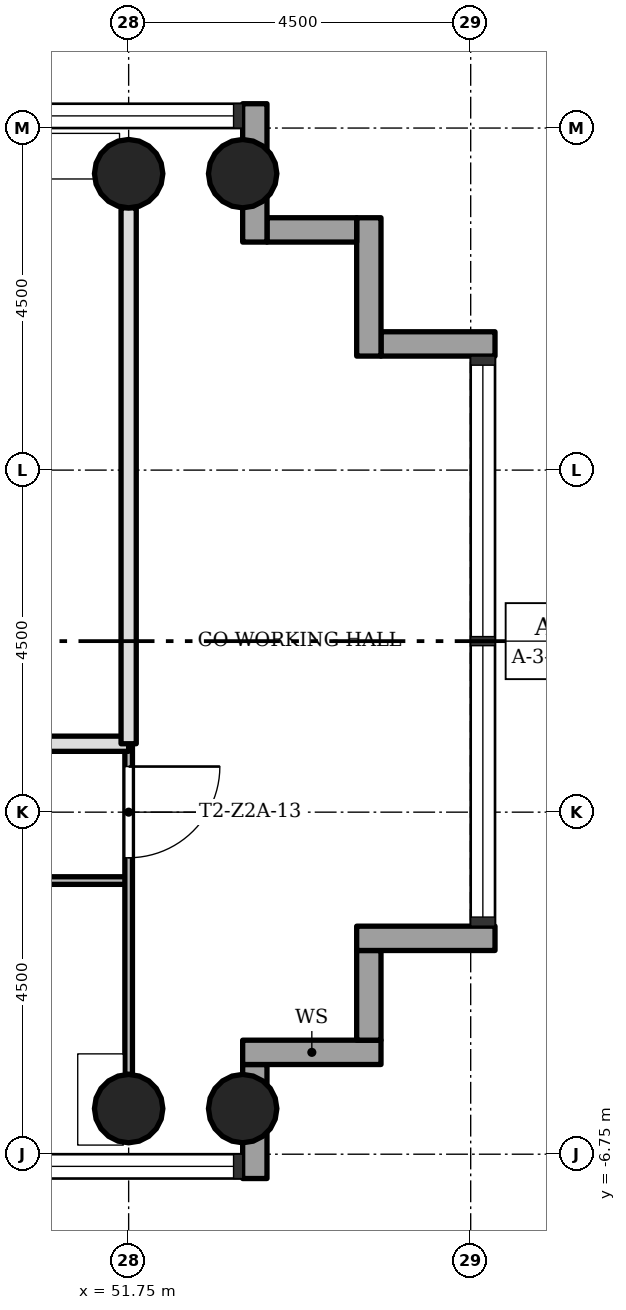
"""IFC4 building model, lengths in metres.
Left out: names, types, materials, properties, quantities, classifications, styles, units other than length and angle.
Written with IfcOpenShell. Run it as: python <this file> out.ifc"""

import sys

from ifc_helpers import new_model, si_unit, direction, frame, frame_2d, origin, origin_2d, place, context, subcontext, project, spatial, rectangle, hollow_circle, extrude, element, fill, save


model = new_model("IFC4")
c1 = context("Model", 3, precision=1e-05, world=origin(), true_north=direction((0.0, 1.0)))
c2 = subcontext(c1, "Body", "Model", "MODEL_VIEW")
j1 = project(units=[si_unit("LENGTHUNIT", "METRE"), si_unit("PLANEANGLEUNIT", "RADIAN")], contexts=[c1])
p1 = place(None, origin())
s1 = spatial("IfcSite", under=j1, at=p1, CompositionType="ELEMENT")
p2 = place(p1, origin())
s2 = spatial("IfcBuilding", under=s1, at=p2, CompositionType="ELEMENT")
p3 = place(p2, frame((0.0, 0.0, 117.4)))
s3 = spatial("IfcBuildingStorey", under=s2, at=p3, CompositionType="ELEMENT", Elevation=117.4)
for number, where, z_axis, x_axis in (
    (1, (51.75, -6.15, 0.0), (0.0, 0.0, 1.0), (1.0, 0.0, 0.0)),
    (2, (51.75, 6.15, 0.0), (0.0, 0.0, 1.0), (1.0, 0.0, 0.0)),
    (3, (53.25, -6.15, 0.0), (0.0, 0.0, 1.0), (1.0, 0.0, 0.0)),
    (4, (53.25, 6.15, 0.0), (0.0, 0.0, 1.0), (1.0, 0.0, 0.0)),
):
    element("IfcColumn", number, at=place(p3, frame(where, z_axis=z_axis, x_axis=x_axis)), inside=s3, PredefinedType="COLUMN", context=c2, shape_type="SweptSolid", body=[
        extrude(hollow_circle(Radius=0.45, WallThickness=0.032, at=origin_2d()), origin(), (0.0, 0.0, 1.0), 3.4),
    ])
p4 = place(p3, frame((53.41, -7.07, -0.3), z_axis=(0.0, 0.0, 1.0), x_axis=(0.0, 1.0, 0.0)))
e5 = element("IfcWall", 5, at=p4, inside=s3, PredefinedType="STANDARD", context=c2, shape_type="SweptSolid", body=[
    extrude(rectangle(XDim=1.5, YDim=0.32, at=frame_2d((0.75, 0.0))), origin(), (0.0, 0.0, 1.0), 3.4),
])
p5 = place(p3, frame((53.25, -5.41, -0.3), z_axis=(0.0, 0.0, 1.0), x_axis=(1.0, 0.0, 0.0)))
e6 = element("IfcWall", 6, at=p5, inside=s3, PredefinedType="STANDARD", context=c2, shape_type="SweptSolid", body=[
    extrude(rectangle(XDim=1.82, YDim=0.32, at=frame_2d((0.91, 0.0))), origin(), (0.0, 0.0, 1.0), 3.4),
])
p6 = place(p3, frame((54.91, -5.25, -0.3), z_axis=(0.0, 0.0, 1.0), x_axis=(0.0, 1.0, 0.0)))
e7 = element("IfcWall", 7, at=p6, inside=s3, PredefinedType="STANDARD", context=c2, shape_type="SweptSolid", body=[
    extrude(rectangle(XDim=1.18, YDim=0.32, at=frame_2d((0.59, 0.0))), origin(), (0.0, 0.0, 1.0), 3.4),
])
p7 = place(p3, frame((54.75, -3.91, -0.3), z_axis=(0.0, 0.0, 1.0), x_axis=(1.0, 0.0, 0.0)))
e8 = element("IfcWall", 8, at=p7, inside=s3, PredefinedType="STANDARD", context=c2, shape_type="SweptSolid", body=[
    extrude(rectangle(XDim=1.82, YDim=0.32, at=frame_2d((0.91, 0.0))), origin(), (0.0, 0.0, 1.0), 3.4),
])
p8 = place(p3, frame((56.57, 3.91, -0.3), z_axis=(0.0, 0.0, 1.0), x_axis=(-1.0, 0.0, 0.0)))
e9 = element("IfcWall", 9, at=p8, inside=s3, PredefinedType="STANDARD", context=c2, shape_type="SweptSolid", body=[
    extrude(rectangle(XDim=1.5, YDim=0.32, at=frame_2d((0.75, 0.0))), origin(), (0.0, 0.0, 1.0), 3.4),
])
p9 = place(p3, frame((54.91, 3.75, -0.3), z_axis=(0.0, 0.0, 1.0), x_axis=(0.0, 1.0, 0.0)))
e10 = element("IfcWall", 10, at=p9, inside=s3, PredefinedType="STANDARD", context=c2, shape_type="SweptSolid", body=[
    extrude(rectangle(XDim=1.82, YDim=0.32, at=frame_2d((0.91, 0.0))), origin(), (0.0, 0.0, 1.0), 3.4),
])
p10 = place(p3, frame((54.75, 5.41, -0.3), z_axis=(0.0, 0.0, 1.0), x_axis=(-1.0, 0.0, 0.0)))
e11 = element("IfcWall", 11, at=p10, inside=s3, PredefinedType="STANDARD", context=c2, shape_type="SweptSolid", body=[
    extrude(rectangle(XDim=1.18, YDim=0.32, at=frame_2d((0.59, 0.0))), origin(), (0.0, 0.0, 1.0), 3.4),
])
p11 = place(p3, frame((53.41, 5.25, -0.3), z_axis=(0.0, 0.0, 1.0), x_axis=(0.0, 1.0, 0.0)))
e12 = element("IfcWall", 12, at=p11, inside=s3, PredefinedType="STANDARD", context=c2, shape_type="SweptSolid", body=[
    extrude(rectangle(XDim=1.82, YDim=0.32, at=frame_2d((0.91, 0.0))), origin(), (0.0, 0.0, 1.0), 3.4),
])
p12 = place(p3, frame((51.75, -3.15, 0.0), z_axis=(0.0, 0.0, 1.0), x_axis=(-1.0, 0.0, 0.0)))
e13 = element("IfcWall", 13, at=p12, inside=s3, PredefinedType="PARTITIONING", context=c2, shape_type="SweptSolid", body=[
    extrude(rectangle(XDim=9.0, YDim=0.1, at=frame_2d((4.5, 0.0))), origin(), (0.0, 0.0, 1.0), 3.0),
])
p13 = place(p12, frame((5.55, 0.0, 0.0)))
e14 = element("IfcOpeningElement", 14, at=p13, cuts=e13, PredefinedType="OPENING", context=c2, shape_type="SweptSolid", body=[
    extrude(rectangle(XDim=0.9, YDim=2.1, at=frame_2d((0.45, 1.05))), frame((0.0, 0.06, 0.0), z_axis=(0.0, -1.0, 0.0), x_axis=(1.0, 0.0, 0.0)), (0.0, 0.0, 1.0), 0.12),
])
p14 = place(p3, frame((51.75, -1.35, 0.0), z_axis=(0.0, 0.0, 1.0), x_axis=(-1.0, 0.0, 0.0)))
e15 = element("IfcWall", 15, at=p14, inside=s3, PredefinedType="SOLIDWALL", context=c2, shape_type="SweptSolid", body=[
    extrude(rectangle(XDim=7.2, YDim=0.2, at=frame_2d((3.6, 0.0))), origin(), (0.0, 0.0, 1.0), 3.0),
])
p15 = place(p14, frame((1.95, 0.0, 0.0)))
e16 = element("IfcOpeningElement", 16, at=p15, cuts=e15, PredefinedType="OPENING", context=c2, shape_type="SweptSolid", body=[
    extrude(rectangle(XDim=0.9, YDim=2.1, at=frame_2d((0.45, 1.05))), frame((0.0, 0.11, 0.0), z_axis=(0.0, -1.0, 0.0), x_axis=(1.0, 0.0, 0.0)), (0.0, 0.0, 1.0), 0.22),
])
p16 = place(p3, frame((51.75, -5.7, 0.0), z_axis=(0.0, 0.0, 1.0), x_axis=(0.0, 1.0, 0.0)))
e17 = element("IfcWall", 17, at=p16, inside=s3, PredefinedType="PARTITIONING", context=c2, shape_type="SweptSolid", body=[
    extrude(rectangle(XDim=4.35, YDim=0.1, at=frame_2d((2.175, 0.0))), origin(), (0.0, 0.0, 1.0), 3.0),
])
p17 = place(p16, frame((2.85, 0.0, 0.0)))
e18 = element("IfcOpeningElement", 18, at=p17, cuts=e17, PredefinedType="OPENING", context=c2, shape_type="SweptSolid", body=[
    extrude(rectangle(XDim=1.2, YDim=2.1, at=frame_2d((0.6, 1.05))), frame((0.0, 0.06, 0.0), z_axis=(0.0, -1.0, 0.0), x_axis=(1.0, 0.0, 0.0)), (0.0, 0.0, 1.0), 0.12),
])
p18 = place(p3, frame((51.75, -1.35, 0.0), z_axis=(0.0, 0.0, 1.0), x_axis=(0.0, 1.0, 0.0)))
e19 = element("IfcWall", 19, at=p18, inside=s3, PredefinedType="SOLIDWALL", context=c2, shape_type="SweptSolid", body=[
    extrude(rectangle(XDim=7.05, YDim=0.2, at=frame_2d((3.525, 0.0))), origin(), (0.0, 0.0, 1.0), 3.0),
])
p19 = place(p17, origin())
e20 = element("IfcDoor", 20, at=p19, inside=s3, OperationType="SINGLE_SWING_RIGHT", PredefinedType="DOOR", context=c2, shape_type="SweptSolid", body=[
    extrude(rectangle(XDim=1.2, YDim=2.1, at=frame_2d((0.6, 1.05))), frame((0.0, 0.025, 0.0), z_axis=(0.0, -1.0, 0.0), x_axis=(1.0, 0.0, 0.0)), (0.0, 0.0, 1.0), 0.05),
])
fill(e18, e20)
save(model, sys.argv[1])
